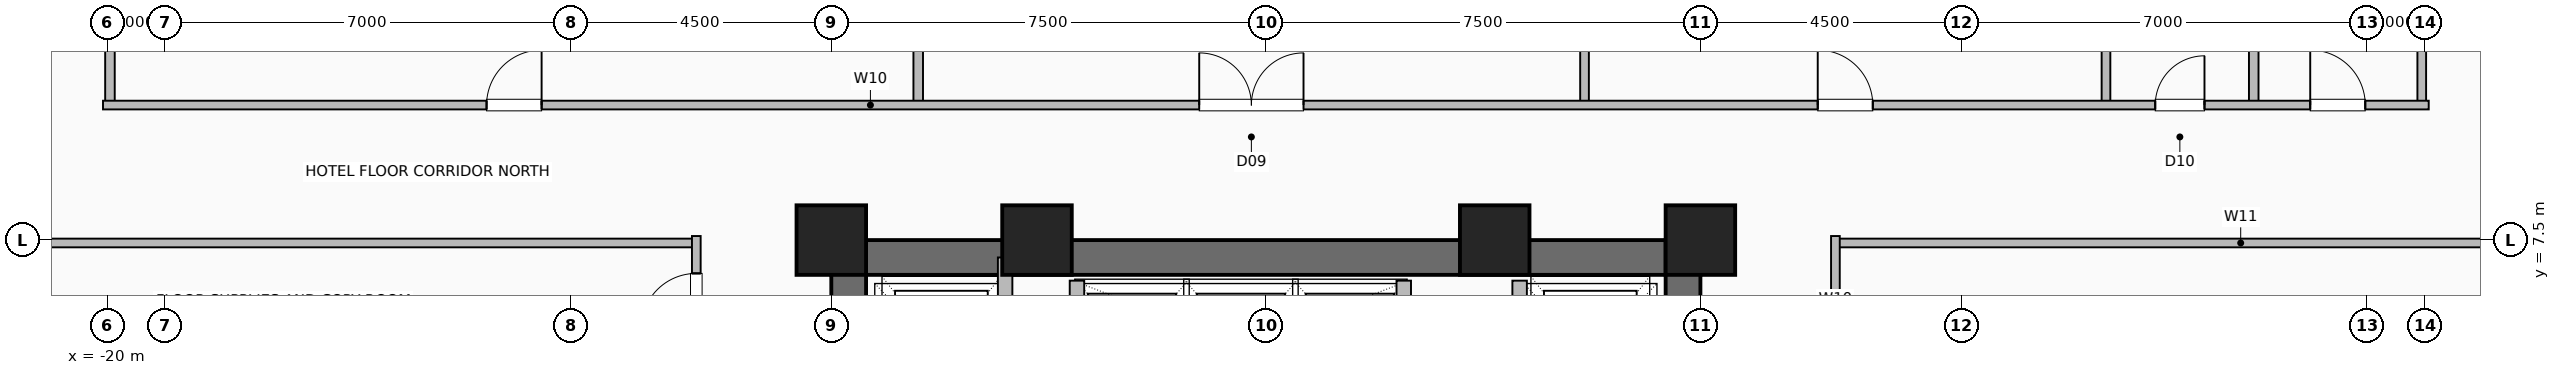
"""IFC4 building model, lengths in metres.
Left out: names, types, materials, properties, quantities, classifications, styles, units other than length and angle.
Written with IfcOpenShell. Run it as: python <this file> out.ifc"""

import sys

from ifc_helpers import new_model, si_unit, direction, frame, frame_2d, origin, origin_2d, place, context, subcontext, project, spatial, rectangle, hollow_rectangle, extrude, element, fill, save


model = new_model("IFC4")
c1 = context("Model", 3, precision=1e-05, world=origin(), true_north=direction((0.0, 1.0)))
c2 = subcontext(c1, "Body", "Model", "MODEL_VIEW")
j1 = project(units=[si_unit("LENGTHUNIT", "METRE"), si_unit("PLANEANGLEUNIT", "RADIAN")], contexts=[c1])
p1 = place(None, origin())
s1 = spatial("IfcSite", under=j1, at=p1, CompositionType="ELEMENT")
p2 = place(p1, origin())
s2 = spatial("IfcBuilding", under=s1, at=p2, CompositionType="ELEMENT")
p3 = place(p2, frame((0.0, 0.0, 37.5)))
s3 = spatial("IfcBuildingStorey", under=s2, at=p3, CompositionType="ELEMENT", Elevation=37.5)
for number, where, z_axis, x_axis in (
    (1, (7.5, 7.5, 0.0), (0.0, 0.0, 1.0), (1.0, 0.0, 0.0)),
    (2, (3.95, 7.5, 0.0), (0.0, 0.0, 1.0), (1.0, 0.0, 0.0)),
    (3, (-3.95, 7.5, 0.0), (0.0, 0.0, 1.0), (1.0, 0.0, 0.0)),
    (4, (-7.5, 7.5, 0.0), (0.0, 0.0, 1.0), (1.0, 0.0, 0.0)),
):
    element("IfcColumn", number, at=place(p3, frame(where, z_axis=z_axis, x_axis=x_axis)), inside=s3, PredefinedType="COLUMN", context=c2, shape_type="SweptSolid", body=[
        extrude(hollow_rectangle(XDim=1.2, YDim=1.2, WallThickness=0.055, at=origin_2d()), origin(), (0.0, 0.0, 1.0), 3.5),
    ])
p4 = place(p3, frame((-7.5, 7.2, 0.0), z_axis=(0.0, 0.0, 1.0), x_axis=(1.0, 0.0, 0.0)))
e5 = element("IfcWall", 5, at=p4, inside=s3, PredefinedType="SHEAR", context=c2, shape_type="SweptSolid", body=[
    extrude(rectangle(XDim=15.0, YDim=0.6, at=frame_2d((7.5, 0.0))), origin(), (0.0, 0.0, 1.0), 3.25),
])
p5 = place(p3, frame((-7.2, -7.5, 0.0), z_axis=(0.0, 0.0, 1.0), x_axis=(0.0, 1.0, 0.0)))
e6 = element("IfcWall", 6, at=p5, inside=s3, PredefinedType="SHEAR", context=c2, shape_type="SweptSolid", body=[
    extrude(rectangle(XDim=15.0, YDim=0.6, at=frame_2d((7.5, 0.0))), origin(), (0.0, 0.0, 1.0), 3.25),
])
p6 = place(p5, frame((9.5, 0.0, 0.0)))
e7 = element("IfcOpeningElement", 7, at=p6, cuts=e6, PredefinedType="OPENING", context=c2, shape_type="SweptSolid", body=[
    extrude(rectangle(XDim=1.0, YDim=2.08, at=frame_2d((0.5, 1.04))), frame((0.0, 0.31, 0.0), z_axis=(0.0, -1.0, 0.0), x_axis=(1.0, 0.0, 0.0)), (0.0, 0.0, 1.0), 0.62),
])
p7 = place(p3, frame((7.2, -7.5, 0.0), z_axis=(0.0, 0.0, 1.0), x_axis=(0.0, 1.0, 0.0)))
e8 = element("IfcWall", 8, at=p7, inside=s3, PredefinedType="SHEAR", context=c2, shape_type="SweptSolid", body=[
    extrude(rectangle(XDim=15.0, YDim=0.6, at=frame_2d((7.5, 0.0))), origin(), (0.0, 0.0, 1.0), 3.25),
])
for number, where, z_axis, x_axis in (
    (9, (-3.26, 4.58, 0.0), (0.0, 0.0, 1.0), (0.0, 1.0, 0.0)),
    (10, (2.38, 4.58, 0.0), (0.0, 0.0, 1.0), (0.0, 1.0, 0.0)),
):
    element("IfcWall", number, at=place(p3, frame(where, z_axis=z_axis, x_axis=x_axis)), inside=s3, PredefinedType="SHEAR", context=c2, shape_type="SweptSolid", body=[
        extrude(rectangle(XDim=2.22, YDim=0.25, at=frame_2d((1.11, 0.0))), origin(), (0.0, 0.0, 1.0), 3.25),
    ])
p8 = place(p3, frame((-4.5, 4.35, 0.0), z_axis=(0.0, 0.0, 1.0), x_axis=(0.0, 1.0, 0.0)))
e11 = element("IfcWall", 11, at=p8, inside=s3, PredefinedType="SHEAR", context=c2, shape_type="SweptSolid", body=[
    extrude(rectangle(XDim=2.85, YDim=0.25, at=frame_2d((1.425, 0.0))), origin(), (0.0, 0.0, 1.0), 3.25),
])
p9 = place(p3, frame((4.38, 4.3, 0.0), z_axis=(0.0, 0.0, 1.0), x_axis=(0.0, 1.0, 0.0)))
e12 = element("IfcWall", 12, at=p9, inside=s3, PredefinedType="SHEAR", context=c2, shape_type="SweptSolid", body=[
    extrude(rectangle(XDim=2.5, YDim=0.25, at=frame_2d((1.25, 0.0))), origin(), (0.0, 0.0, 1.0), 3.25),
])
p10 = place(p9, frame((0.8, 0.0, 0.0)))
e13 = element("IfcOpeningElement", 13, at=p10, cuts=e12, PredefinedType="OPENING", context=c2, shape_type="SweptSolid", body=[
    extrude(rectangle(XDim=1.2, YDim=2.2, at=frame_2d((0.6, 1.1))), frame((0.0, 0.135, 0.0), z_axis=(0.0, -1.0, 0.0), x_axis=(1.0, 0.0, 0.0)), (0.0, 0.0, 1.0), 0.27),
])
for number, where, z_axis, x_axis in (
    (14, (17.05, 9.83, 0.0), (0.0, 0.0, 1.0), (0.0, 1.0, 0.0)),
    (15, (-19.95, 9.83, 0.0), (0.0, 0.0, 1.0), (0.0, 1.0, 0.0)),
    (16, (-6.0, 9.83, 0.0), (0.0, 0.0, 1.0), (0.0, 1.0, 0.0)),
):
    element("IfcWall", number, at=place(p3, frame(where, z_axis=z_axis, x_axis=x_axis)), inside=s3, PredefinedType="PLUMBINGWALL", context=c2, shape_type="SweptSolid", body=[
        extrude(rectangle(XDim=13.99, YDim=0.165, at=frame_2d((6.995, 0.0))), origin(), (0.0, 0.0, 1.0), 3.25),
    ])
for number, where, z_axis, x_axis in (
    (17, (5.5, 9.83, 0.0), (0.0, 0.0, 1.0), (0.0, 1.0, 0.0)),
    (18, (14.5, 9.83, 0.0), (0.0, 0.0, 1.0), (0.0, 1.0, 0.0)),
    (19, (19.95, 9.83, 0.0), (0.0, 0.0, 1.0), (0.0, 1.0, 0.0)),
):
    element("IfcWall", number, at=place(p3, frame(where, z_axis=z_axis, x_axis=x_axis)), inside=s3, PredefinedType="PARTITIONING", context=c2, shape_type="SweptSolid", body=[
        extrude(rectangle(XDim=13.99, YDim=0.15, at=frame_2d((6.995, 0.0))), origin(), (0.0, 0.0, 1.0), 3.25),
    ])
p11 = place(p3, frame((-20.07, 9.83, 0.0), z_axis=(0.0, 0.0, 1.0), x_axis=(1.0, 0.0, 0.0)))
e20 = element("IfcWall", 20, at=p11, inside=s3, PredefinedType="PARTITIONING", context=c2, shape_type="SweptSolid", body=[
    extrude(rectangle(XDim=40.14, YDim=0.15, at=frame_2d((20.07, 0.0))), origin(), (0.0, 0.0, 1.0), 3.25),
])
p12 = place(p11, frame((6.62, 0.0, 0.0)))
e21 = element("IfcOpeningElement", 21, at=p12, cuts=e20, PredefinedType="OPENING", context=c2, shape_type="SweptSolid", body=[
    extrude(rectangle(XDim=0.95, YDim=2.06, at=frame_2d((0.475, 1.03))), frame((0.0, 0.085, 0.0), z_axis=(0.0, -1.0, 0.0), x_axis=(1.0, 0.0, 0.0)), (0.0, 0.0, 1.0), 0.17),
])
p13 = place(p11, frame((18.92, 0.0, 0.0)))
e22 = element("IfcOpeningElement", 22, at=p13, cuts=e20, PredefinedType="OPENING", context=c2, shape_type="SweptSolid", body=[
    extrude(rectangle(XDim=1.8, YDim=2.08, at=frame_2d((0.9, 1.04))), frame((0.0, 0.085, 0.0), z_axis=(0.0, -1.0, 0.0), x_axis=(1.0, 0.0, 0.0)), (0.0, 0.0, 1.0), 0.17),
])
p14 = place(p11, frame((29.595, 0.0, 0.0)))
e23 = element("IfcOpeningElement", 23, at=p14, cuts=e20, PredefinedType="OPENING", context=c2, shape_type="SweptSolid", body=[
    extrude(rectangle(XDim=0.95, YDim=2.06, at=frame_2d((0.475, 1.03))), frame((0.0, 0.085, 0.0), z_axis=(0.0, -1.0, 0.0), x_axis=(1.0, 0.0, 0.0)), (0.0, 0.0, 1.0), 0.17),
])
p15 = place(p11, frame((35.42, 0.0, 0.0)))
e24 = element("IfcOpeningElement", 24, at=p15, cuts=e20, PredefinedType="OPENING", context=c2, shape_type="SweptSolid", body=[
    extrude(rectangle(XDim=0.85, YDim=2.05, at=frame_2d((0.425, 1.025))), frame((0.0, 0.085, 0.0), z_axis=(0.0, -1.0, 0.0), x_axis=(1.0, 0.0, 0.0)), (0.0, 0.0, 1.0), 0.17),
])
p16 = place(p11, frame((38.095, 0.0, 0.0)))
e25 = element("IfcOpeningElement", 25, at=p16, cuts=e20, PredefinedType="OPENING", context=c2, shape_type="SweptSolid", body=[
    extrude(rectangle(XDim=0.95, YDim=2.06, at=frame_2d((0.475, 1.03))), frame((0.0, 0.085, 0.0), z_axis=(0.0, -1.0, 0.0), x_axis=(1.0, 0.0, 0.0)), (0.0, 0.0, 1.0), 0.17),
])
p17 = place(p3, frame((-23.82, 7.45, 0.0), z_axis=(0.0, 0.0, 1.0), x_axis=(1.0, 0.0, 0.0)))
e26 = element("IfcWall", 26, at=p17, inside=s3, PredefinedType="PARTITIONING", context=c2, shape_type="SweptSolid", body=[
    extrude(rectangle(XDim=13.99, YDim=0.15, at=frame_2d((6.995, 0.0))), origin(), (0.0, 0.0, 1.0), 3.25),
])
p18 = place(p3, frame((-9.83, -7.57, 0.0), z_axis=(0.0, 0.0, 1.0), x_axis=(0.0, 1.0, 0.0)))
e27 = element("IfcWall", 27, at=p18, inside=s3, PredefinedType="PARTITIONING", context=c2, shape_type="SweptSolid", body=[
    extrude(rectangle(XDim=15.14, YDim=0.15, at=frame_2d((7.57, 0.0))), origin(), (0.0, 0.0, 1.0), 3.25),
])
p19 = place(p18, frame((4.845, 0.0, 0.0)))
e28 = element("IfcOpeningElement", 28, at=p19, cuts=e27, PredefinedType="OPENING", context=c2, shape_type="SweptSolid", body=[
    extrude(rectangle(XDim=1.8, YDim=2.08, at=frame_2d((0.9, 1.04))), frame((0.0, 0.085, 0.0), z_axis=(0.0, -1.0, 0.0), x_axis=(1.0, 0.0, 0.0)), (0.0, 0.0, 1.0), 0.17),
])
p20 = place(p18, frame((11.77, 0.0, 0.0)))
e29 = element("IfcOpeningElement", 29, at=p20, cuts=e27, PredefinedType="OPENING", context=c2, shape_type="SweptSolid", body=[
    extrude(rectangle(XDim=0.85, YDim=2.05, at=frame_2d((0.425, 1.025))), frame((0.0, 0.085, 0.0), z_axis=(0.0, -1.0, 0.0), x_axis=(1.0, 0.0, 0.0)), (0.0, 0.0, 1.0), 0.17),
])
p21 = place(p18, frame((13.545, 0.0, 0.0)))
e30 = element("IfcOpeningElement", 30, at=p21, cuts=e27, PredefinedType="OPENING", context=c2, shape_type="SweptSolid", body=[
    extrude(rectangle(XDim=0.95, YDim=2.06, at=frame_2d((0.475, 1.03))), frame((0.0, 0.085, 0.0), z_axis=(0.0, -1.0, 0.0), x_axis=(1.0, 0.0, 0.0)), (0.0, 0.0, 1.0), 0.17),
])
p22 = place(p3, frame((9.83, 7.45, 0.0), z_axis=(0.0, 0.0, 1.0), x_axis=(1.0, 0.0, 0.0)))
e31 = element("IfcWall", 31, at=p22, inside=s3, PredefinedType="PARTITIONING", context=c2, shape_type="SweptSolid", body=[
    extrude(rectangle(XDim=13.99, YDim=0.15, at=frame_2d((6.995, 0.0))), origin(), (0.0, 0.0, 1.0), 3.25),
])
p23 = place(p3, frame((9.83, -7.57, 0.0), z_axis=(0.0, 0.0, 1.0), x_axis=(0.0, 1.0, 0.0)))
e32 = element("IfcWall", 32, at=p23, inside=s3, PredefinedType="PARTITIONING", context=c2, shape_type="SweptSolid", body=[
    extrude(rectangle(XDim=15.14, YDim=0.15, at=frame_2d((7.57, 0.0))), origin(), (0.0, 0.0, 1.0), 3.25),
])
p24 = place(p23, frame((2.12, 0.0, 0.0)))
e33 = element("IfcOpeningElement", 33, at=p24, cuts=e32, PredefinedType="OPENING", context=c2, shape_type="SweptSolid", body=[
    extrude(rectangle(XDim=0.95, YDim=2.06, at=frame_2d((0.475, 1.03))), frame((0.0, 0.085, 0.0), z_axis=(0.0, -1.0, 0.0), x_axis=(1.0, 0.0, 0.0)), (0.0, 0.0, 1.0), 0.17),
])
p25 = place(p23, frame((7.095, 0.0, 0.0)))
e34 = element("IfcOpeningElement", 34, at=p25, cuts=e32, PredefinedType="OPENING", context=c2, shape_type="SweptSolid", body=[
    extrude(rectangle(XDim=0.95, YDim=2.06, at=frame_2d((0.475, 1.03))), frame((0.0, 0.085, 0.0), z_axis=(0.0, -1.0, 0.0), x_axis=(1.0, 0.0, 0.0)), (0.0, 0.0, 1.0), 0.17),
])
p26 = place(p23, frame((12.07, 0.0, 0.0)))
e35 = element("IfcOpeningElement", 35, at=p26, cuts=e32, PredefinedType="OPENING", context=c2, shape_type="SweptSolid", body=[
    extrude(rectangle(XDim=0.95, YDim=2.06, at=frame_2d((0.475, 1.03))), frame((0.0, 0.085, 0.0), z_axis=(0.0, -1.0, 0.0), x_axis=(1.0, 0.0, 0.0)), (0.0, 0.0, 1.0), 0.17),
])
p27 = place(p12, origin())
e36 = element("IfcDoor", 36, at=p27, inside=s3, OperationType="SINGLE_SWING_RIGHT", PredefinedType="DOOR", context=c2, shape_type="SweptSolid", body=[
    extrude(rectangle(XDim=0.95, YDim=2.06, at=frame_2d((0.475, 1.03))), frame((0.0, 0.025, 0.0), z_axis=(0.0, -1.0, 0.0), x_axis=(1.0, 0.0, 0.0)), (0.0, 0.0, 1.0), 0.05),
])
fill(e21, e36)
p28 = place(p13, origin())
e37 = element("IfcDoor", 37, at=p28, inside=s3, OperationType="DOUBLE_DOOR_SINGLE_SWING", PredefinedType="DOOR", context=c2, shape_type="SweptSolid", body=[
    extrude(rectangle(XDim=1.8, YDim=2.08, at=frame_2d((0.9, 1.04))), frame((0.0, 0.025, 0.0), z_axis=(0.0, -1.0, 0.0), x_axis=(1.0, 0.0, 0.0)), (0.0, 0.0, 1.0), 0.05),
])
fill(e22, e37)
p29 = place(p14, origin())
e38 = element("IfcDoor", 38, at=p29, inside=s3, OperationType="SINGLE_SWING_LEFT", PredefinedType="DOOR", context=c2, shape_type="SweptSolid", body=[
    extrude(rectangle(XDim=0.95, YDim=2.06, at=frame_2d((0.475, 1.03))), frame((0.0, 0.025, 0.0), z_axis=(0.0, -1.0, 0.0), x_axis=(1.0, 0.0, 0.0)), (0.0, 0.0, 1.0), 0.05),
])
fill(e23, e38)
p30 = place(p15, origin())
e39 = element("IfcDoor", 39, at=p30, inside=s3, OperationType="SINGLE_SWING_RIGHT", PredefinedType="DOOR", context=c2, shape_type="SweptSolid", body=[
    extrude(rectangle(XDim=0.85, YDim=2.05, at=frame_2d((0.425, 1.025))), frame((0.0, 0.025, 0.0), z_axis=(0.0, -1.0, 0.0), x_axis=(1.0, 0.0, 0.0)), (0.0, 0.0, 1.0), 0.05),
])
fill(e24, e39)
p31 = place(p16, origin())
e40 = element("IfcDoor", 40, at=p31, inside=s3, OperationType="SINGLE_SWING_LEFT", PredefinedType="DOOR", context=c2, shape_type="SweptSolid", body=[
    extrude(rectangle(XDim=0.95, YDim=2.06, at=frame_2d((0.475, 1.03))), frame((0.0, 0.025, 0.0), z_axis=(0.0, -1.0, 0.0), x_axis=(1.0, 0.0, 0.0)), (0.0, 0.0, 1.0), 0.05),
])
fill(e25, e40)
p32 = place(p21, origin())
e41 = element("IfcDoor", 41, at=p32, inside=s3, OperationType="SINGLE_SWING_LEFT", PredefinedType="DOOR", context=c2, shape_type="SweptSolid", body=[
    extrude(rectangle(XDim=0.95, YDim=2.06, at=frame_2d((0.475, 1.03))), frame((0.0, 0.025, 0.0), z_axis=(0.0, -1.0, 0.0), x_axis=(1.0, 0.0, 0.0)), (0.0, 0.0, 1.0), 0.05),
])
fill(e30, e41)
save(model, sys.argv[1])
